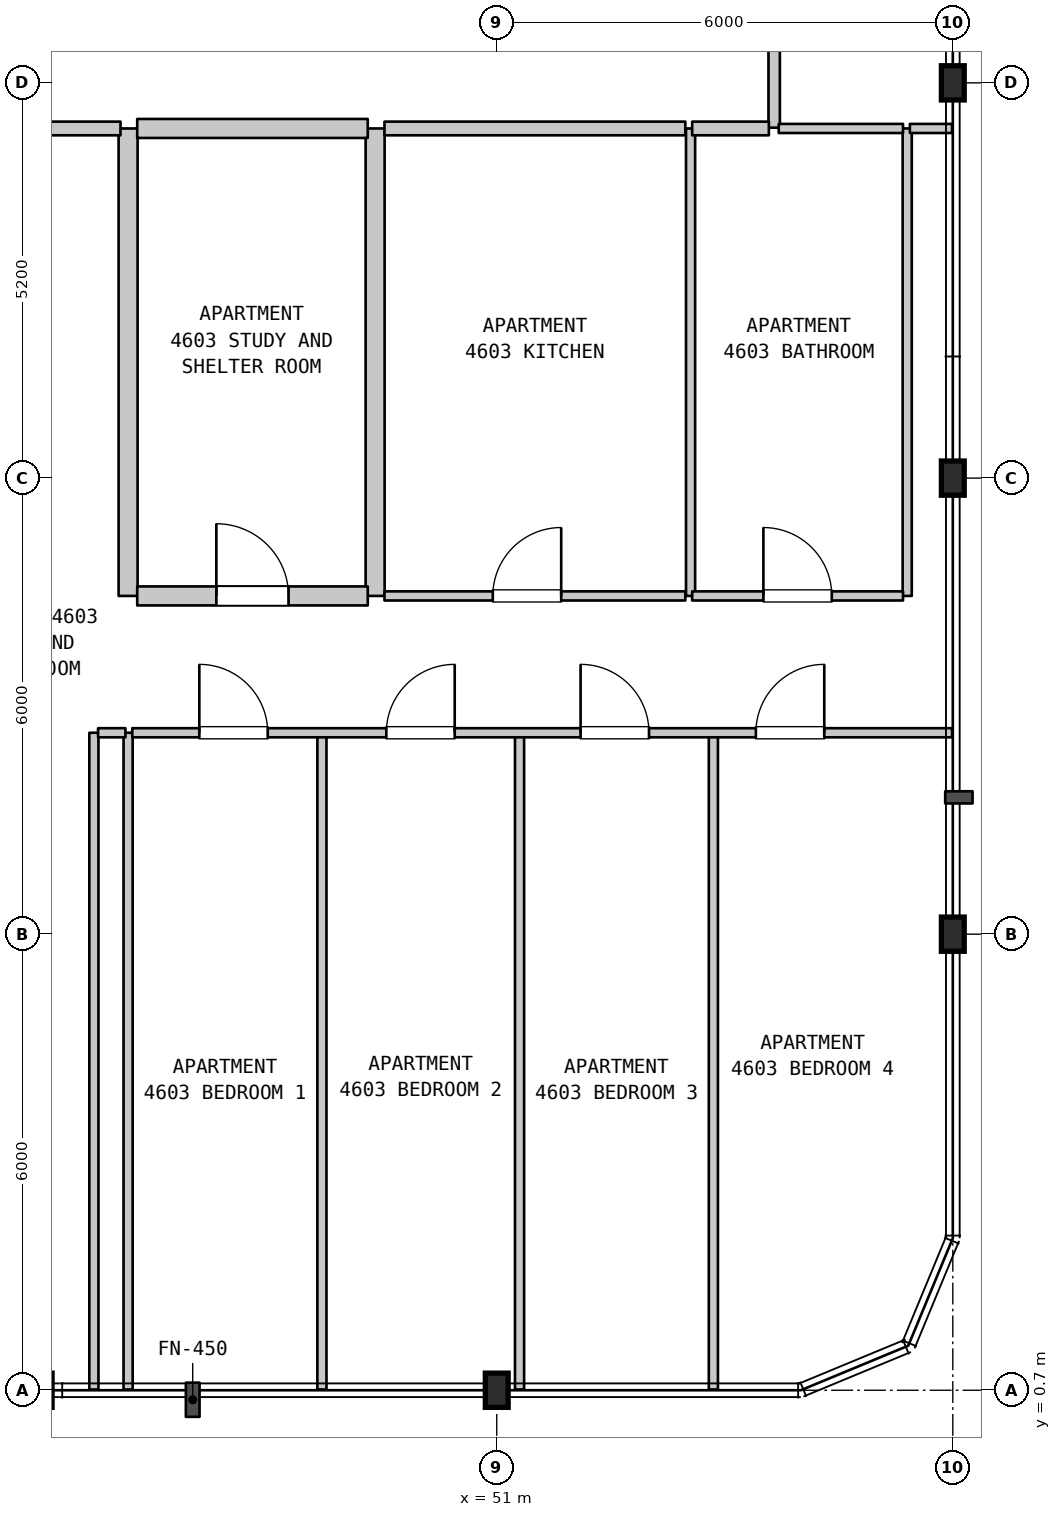
"""IFC4 building model, lengths in metres.
Left out: names, types, materials, properties, quantities, classifications, styles, units other than length and angle.
Written with IfcOpenShell. Run it as: python <this file> out.ifc"""

import sys

from ifc_helpers import new_model, si_unit, direction, frame, frame_2d, origin, origin_2d, place, context, subcontext, project, spatial, rectangle, i_section, extrude, element, fill, save


model = new_model("IFC4")
c1 = context("Model", 3, precision=1e-05, world=origin(), true_north=direction((0.0, 1.0)))
c2 = subcontext(c1, "Body", "Model", "MODEL_VIEW")
j1 = project(units=[si_unit("LENGTHUNIT", "METRE"), si_unit("PLANEANGLEUNIT", "RADIAN")], contexts=[c1])
p1 = place(None, origin())
s1 = spatial("IfcSite", under=j1, at=p1, CompositionType="ELEMENT")
p2 = place(p1, origin())
s2 = spatial("IfcBuilding", under=s1, at=p2, CompositionType="ELEMENT")
p3 = place(p2, frame((0.0, 0.0, 188.4)))
s3 = spatial("IfcBuildingStorey", under=s2, at=p3, CompositionType="ELEMENT", Elevation=188.4)
for number, where, z_axis, x_axis in (
    (1, (51.0, 0.7, 0.0), (0.0, 0.0, 1.0), (1.0, 0.0, 0.0)),
    (2, (57.0, 6.7, 0.0), (0.0, 0.0, 1.0), (1.0, 0.0, 0.0)),
    (3, (57.0, 12.7, 0.0), (0.0, 0.0, 1.0), (1.0, 0.0, 0.0)),
    (4, (57.0, 17.9, 0.0), (0.0, 0.0, 1.0), (1.0, 0.0, 0.0)),
):
    element("IfcColumn", number, at=place(p3, frame(where, z_axis=z_axis, x_axis=x_axis)), inside=s3, PredefinedType="COLUMN", context=c2, shape_type="SweptSolid", body=[
        extrude(i_section(OverallWidth=0.3, OverallDepth=0.45, WebThickness=0.014, FlangeThickness=0.026, FilletRadius=0.027, at=origin_2d()), origin(), (0.0, 0.0, 1.0), 3.7),
    ])
for number, where, z_axis, x_axis in (
    (5, (45.7, 0.71, 0.0), (0.0, 0.0, 1.0), (0.0, 1.0, 0.0)),
    (6, (46.15, 0.71, 0.0), (0.0, 0.0, 1.0), (0.0, 1.0, 0.0)),
):
    element("IfcWall", number, at=place(p3, frame(where, z_axis=z_axis, x_axis=x_axis)), inside=s3, PredefinedType="PARTITIONING", context=c2, shape_type="SweptSolid", body=[
        extrude(rectangle(XDim=8.64, YDim=0.12, at=frame_2d((4.32, 0.0))), origin(), (0.0, 0.0, 1.0), 3.39),
    ])
p4 = place(p3, frame((46.15, 11.15, 0.0), z_axis=(0.0, 0.0, 1.0), x_axis=(0.0, 1.0, 0.0)))
e7 = element("IfcWall", 7, at=p4, inside=s3, PredefinedType="STANDARD", context=c2, shape_type="SweptSolid", body=[
    extrude(rectangle(XDim=6.15, YDim=0.25, at=frame_2d((3.075, 0.0))), origin(), (0.0, 0.0, 1.0), 3.39),
])
p5 = place(p3, frame((48.7, 0.71, 0.0), z_axis=(0.0, 0.0, 1.0), x_axis=(0.0, 1.0, 0.0)))
e8 = element("IfcWall", 8, at=p5, inside=s3, PredefinedType="PARTITIONING", context=c2, shape_type="SweptSolid", body=[
    extrude(rectangle(XDim=8.64, YDim=0.12, at=frame_2d((4.32, 0.0))), origin(), (0.0, 0.0, 1.0), 3.39),
])
p6 = place(p3, frame((49.4, 11.15, 0.0), z_axis=(0.0, 0.0, 1.0), x_axis=(0.0, 1.0, 0.0)))
e9 = element("IfcWall", 9, at=p6, inside=s3, PredefinedType="STANDARD", context=c2, shape_type="SweptSolid", body=[
    extrude(rectangle(XDim=6.15, YDim=0.25, at=frame_2d((3.075, 0.0))), origin(), (0.0, 0.0, 1.0), 3.39),
])
p7 = place(p3, frame((51.3, 0.71, 0.0), z_axis=(0.0, 0.0, 1.0), x_axis=(0.0, 1.0, 0.0)))
e10 = element("IfcWall", 10, at=p7, inside=s3, PredefinedType="PARTITIONING", context=c2, shape_type="SweptSolid", body=[
    extrude(rectangle(XDim=8.64, YDim=0.12, at=frame_2d((4.32, 0.0))), origin(), (0.0, 0.0, 1.0), 3.39),
])
p8 = place(p3, frame((53.55, 11.15, 0.0), z_axis=(0.0, 0.0, 1.0), x_axis=(0.0, 1.0, 0.0)))
e11 = element("IfcWall", 11, at=p8, inside=s3, PredefinedType="PARTITIONING", context=c2, shape_type="SweptSolid", body=[
    extrude(rectangle(XDim=6.15, YDim=0.12, at=frame_2d((3.075, 0.0))), origin(), (0.0, 0.0, 1.0), 3.39),
])
p9 = place(p3, frame((53.85, 0.71, 0.0), z_axis=(0.0, 0.0, 1.0), x_axis=(0.0, 1.0, 0.0)))
e12 = element("IfcWall", 12, at=p9, inside=s3, PredefinedType="PARTITIONING", context=c2, shape_type="SweptSolid", body=[
    extrude(rectangle(XDim=8.64, YDim=0.12, at=frame_2d((4.32, 0.0))), origin(), (0.0, 0.0, 1.0), 3.39),
])
p10 = place(p3, frame((54.65, 17.31, 0.0), z_axis=(0.0, 0.0, 1.0), x_axis=(0.0, 1.0, 0.0)))
e13 = element("IfcWall", 13, at=p10, inside=s3, PredefinedType="STANDARD", context=c2, shape_type="SweptSolid", body=[
    extrude(rectangle(XDim=2.19, YDim=0.15, at=frame_2d((1.095, 0.0))), origin(), (0.0, 0.0, 1.0), 3.39),
])
p11 = place(p3, frame((56.4, 11.15, 0.0), z_axis=(0.0, 0.0, 1.0), x_axis=(0.0, 1.0, 0.0)))
e14 = element("IfcWall", 14, at=p11, inside=s3, PredefinedType="PARTITIONING", context=c2, shape_type="SweptSolid", body=[
    extrude(rectangle(XDim=6.15, YDim=0.12, at=frame_2d((3.075, 0.0))), origin(), (0.0, 0.0, 1.0), 3.39),
])
p12 = place(p3, frame((45.755, 9.35, 0.0), z_axis=(0.0, 0.0, 1.0), x_axis=(1.0, 0.0, 0.0)))
e15 = element("IfcWall", 15, at=p12, inside=s3, PredefinedType="PARTITIONING", context=c2, shape_type="SweptSolid", body=[
    extrude(rectangle(XDim=0.36, YDim=0.12, at=frame_2d((0.18, 0.0))), origin(), (0.0, 0.0, 1.0), 3.39),
])
p13 = place(p3, frame((46.205, 9.35, 0.0), z_axis=(0.0, 0.0, 1.0), x_axis=(1.0, 0.0, 0.0)))
e16 = element("IfcWall", 16, at=p13, inside=s3, PredefinedType="PARTITIONING", context=c2, shape_type="SweptSolid", body=[
    extrude(rectangle(XDim=10.785, YDim=0.12, at=frame_2d((5.393, 0.0))), origin(), (0.0, 0.0, 1.0), 3.39),
])
p14 = place(p13, frame((0.882, 0.0, 0.0)))
e17 = element("IfcOpeningElement", 17, at=p14, cuts=e16, PredefinedType="OPENING", context=c2, shape_type="SweptSolid", body=[
    extrude(rectangle(XDim=0.9, YDim=2.15, at=frame_2d((0.45, 1.075))), frame((0.0, 0.07, 0.0), z_axis=(0.0, -1.0, 0.0), x_axis=(1.0, 0.0, 0.0)), (0.0, 0.0, 1.0), 0.14),
])
p15 = place(p13, frame((3.342, 0.0, 0.0)))
e18 = element("IfcOpeningElement", 18, at=p15, cuts=e16, PredefinedType="OPENING", context=c2, shape_type="SweptSolid", body=[
    extrude(rectangle(XDim=0.9, YDim=2.15, at=frame_2d((0.45, 1.075))), frame((0.0, 0.07, 0.0), z_axis=(0.0, -1.0, 0.0), x_axis=(1.0, 0.0, 0.0)), (0.0, 0.0, 1.0), 0.14),
])
p16 = place(p13, frame((5.898, 0.0, 0.0)))
e19 = element("IfcOpeningElement", 19, at=p16, cuts=e16, PredefinedType="OPENING", context=c2, shape_type="SweptSolid", body=[
    extrude(rectangle(XDim=0.9, YDim=2.15, at=frame_2d((0.45, 1.075))), frame((0.0, 0.07, 0.0), z_axis=(0.0, -1.0, 0.0), x_axis=(1.0, 0.0, 0.0)), (0.0, 0.0, 1.0), 0.14),
])
p17 = place(p13, frame((8.204, 0.0, 0.0)))
e20 = element("IfcOpeningElement", 20, at=p17, cuts=e16, PredefinedType="OPENING", context=c2, shape_type="SweptSolid", body=[
    extrude(rectangle(XDim=0.9, YDim=2.15, at=frame_2d((0.45, 1.075))), frame((0.0, 0.07, 0.0), z_axis=(0.0, -1.0, 0.0), x_axis=(1.0, 0.0, 0.0)), (0.0, 0.0, 1.0), 0.14),
])
p18 = place(p3, frame((46.27, 11.15, 0.0), z_axis=(0.0, 0.0, 1.0), x_axis=(1.0, 0.0, 0.0)))
e21 = element("IfcWall", 21, at=p18, inside=s3, PredefinedType="STANDARD", context=c2, shape_type="SweptSolid", body=[
    extrude(rectangle(XDim=3.033, YDim=0.25, at=frame_2d((1.517, 0.0))), origin(), (0.0, 0.0, 1.0), 3.39),
])
p19 = place(p18, frame((1.041, 0.0, 0.0)))
e22 = element("IfcOpeningElement", 22, at=p19, cuts=e21, PredefinedType="OPENING", context=c2, shape_type="SweptSolid", body=[
    extrude(rectangle(XDim=0.95, YDim=2.15, at=frame_2d((0.475, 1.075))), frame((0.0, 0.135, 0.0), z_axis=(0.0, -1.0, 0.0), x_axis=(1.0, 0.0, 0.0)), (0.0, 0.0, 1.0), 0.27),
])
p20 = place(p3, frame((49.523, 11.15, 0.0), z_axis=(0.0, 0.0, 1.0), x_axis=(1.0, 0.0, 0.0)))
e23 = element("IfcWall", 23, at=p20, inside=s3, PredefinedType="PARTITIONING", context=c2, shape_type="SweptSolid", body=[
    extrude(rectangle(XDim=3.958, YDim=0.12, at=frame_2d((1.979, 0.0))), origin(), (0.0, 0.0, 1.0), 3.39),
])
p21 = place(p20, frame((1.425, 0.0, 0.0)))
e24 = element("IfcOpeningElement", 24, at=p21, cuts=e23, PredefinedType="OPENING", context=c2, shape_type="SweptSolid", body=[
    extrude(rectangle(XDim=0.9, YDim=2.15, at=frame_2d((0.45, 1.075))), frame((0.0, 0.07, 0.0), z_axis=(0.0, -1.0, 0.0), x_axis=(1.0, 0.0, 0.0)), (0.0, 0.0, 1.0), 0.14),
])
p22 = place(p3, frame((53.571, 11.15, 0.0), z_axis=(0.0, 0.0, 1.0), x_axis=(1.0, 0.0, 0.0)))
e25 = element("IfcWall", 25, at=p22, inside=s3, PredefinedType="PARTITIONING", context=c2, shape_type="SweptSolid", body=[
    extrude(rectangle(XDim=2.774, YDim=0.12, at=frame_2d((1.387, 0.0))), origin(), (0.0, 0.0, 1.0), 3.39),
])
p23 = place(p22, frame((0.937, 0.0, 0.0)))
e26 = element("IfcOpeningElement", 26, at=p23, cuts=e25, PredefinedType="OPENING", context=c2, shape_type="SweptSolid", body=[
    extrude(rectangle(XDim=0.9, YDim=2.1, at=frame_2d((0.45, 1.05))), frame((0.0, 0.07, 0.0), z_axis=(0.0, -1.0, 0.0), x_axis=(1.0, 0.0, 0.0)), (0.0, 0.0, 1.0), 0.14),
])
p24 = place(p3, frame((40.505, 17.3, 0.0), z_axis=(0.0, 0.0, 1.0), x_axis=(1.0, 0.0, 0.0)))
e27 = element("IfcWall", 27, at=p24, inside=s3, PredefinedType="STANDARD", context=c2, shape_type="SweptSolid", body=[
    extrude(rectangle(XDim=5.545, YDim=0.18, at=frame_2d((2.772, 0.0))), origin(), (0.0, 0.0, 1.0), 3.39),
])
p25 = place(p24, frame((2.305, 0.0, 0.0)))
e28 = element("IfcOpeningElement", 28, at=p25, cuts=e27, PredefinedType="OPENING", context=c2, shape_type="SweptSolid", body=[
    extrude(rectangle(XDim=1.0, YDim=2.15, at=frame_2d((0.5, 1.075))), frame((0.0, 0.1, 0.0), z_axis=(0.0, -1.0, 0.0), x_axis=(1.0, 0.0, 0.0)), (0.0, 0.0, 1.0), 0.2),
])
p26 = place(p3, frame((46.27, 17.3, 0.0), z_axis=(0.0, 0.0, 1.0), x_axis=(1.0, 0.0, 0.0)))
e29 = element("IfcWall", 29, at=p26, inside=s3, PredefinedType="STANDARD", context=c2, shape_type="SweptSolid", body=[
    extrude(rectangle(XDim=3.033, YDim=0.25, at=frame_2d((1.517, 0.0))), origin(), (0.0, 0.0, 1.0), 3.39),
])
p27 = place(p3, frame((49.523, 17.3, 0.0), z_axis=(0.0, 0.0, 1.0), x_axis=(1.0, 0.0, 0.0)))
e30 = element("IfcWall", 30, at=p27, inside=s3, PredefinedType="STANDARD", context=c2, shape_type="SweptSolid", body=[
    extrude(rectangle(XDim=3.958, YDim=0.18, at=frame_2d((1.979, 0.0))), origin(), (0.0, 0.0, 1.0), 3.39),
])
p28 = place(p3, frame((53.571, 17.3, 0.0), z_axis=(0.0, 0.0, 1.0), x_axis=(1.0, 0.0, 0.0)))
e31 = element("IfcWall", 31, at=p28, inside=s3, PredefinedType="STANDARD", context=c2, shape_type="SweptSolid", body=[
    extrude(rectangle(XDim=1.009, YDim=0.18, at=frame_2d((0.504, 0.0))), origin(), (0.0, 0.0, 1.0), 3.39),
])
p29 = place(p3, frame((54.71, 17.3, 0.0), z_axis=(0.0, 0.0, 1.0), x_axis=(1.0, 0.0, 0.0)))
e32 = element("IfcWall", 32, at=p29, inside=s3, PredefinedType="PARTITIONING", context=c2, shape_type="SweptSolid", body=[
    extrude(rectangle(XDim=1.635, YDim=0.12, at=frame_2d((0.817, 0.0))), origin(), (0.0, 0.0, 1.0), 3.39),
])
p30 = place(p3, frame((56.435, 17.3, 0.0), z_axis=(0.0, 0.0, 1.0), x_axis=(1.0, 0.0, 0.0)))
e33 = element("IfcWall", 33, at=p30, inside=s3, PredefinedType="PARTITIONING", context=c2, shape_type="SweptSolid", body=[
    extrude(rectangle(XDim=0.555, YDim=0.12, at=frame_2d((0.277, 0.0))), origin(), (0.0, 0.0, 1.0), 3.39),
])
p31 = place(p14, origin())
e34 = element("IfcDoor", 34, at=p31, inside=s3, OperationType="SINGLE_SWING_LEFT", PredefinedType="DOOR", context=c2, shape_type="SweptSolid", body=[
    extrude(rectangle(XDim=0.9, YDim=2.15, at=frame_2d((0.45, 1.075))), frame((0.0, 0.025, 0.0), z_axis=(0.0, -1.0, 0.0), x_axis=(1.0, 0.0, 0.0)), (0.0, 0.0, 1.0), 0.05),
])
fill(e17, e34)
p32 = place(p15, origin())
e35 = element("IfcDoor", 35, at=p32, inside=s3, OperationType="SINGLE_SWING_RIGHT", PredefinedType="DOOR", context=c2, shape_type="SweptSolid", body=[
    extrude(rectangle(XDim=0.9, YDim=2.15, at=frame_2d((0.45, 1.075))), frame((0.0, 0.025, 0.0), z_axis=(0.0, -1.0, 0.0), x_axis=(1.0, 0.0, 0.0)), (0.0, 0.0, 1.0), 0.05),
])
fill(e18, e35)
p33 = place(p16, origin())
e36 = element("IfcDoor", 36, at=p33, inside=s3, OperationType="SINGLE_SWING_LEFT", PredefinedType="DOOR", context=c2, shape_type="SweptSolid", body=[
    extrude(rectangle(XDim=0.9, YDim=2.15, at=frame_2d((0.45, 1.075))), frame((0.0, 0.025, 0.0), z_axis=(0.0, -1.0, 0.0), x_axis=(1.0, 0.0, 0.0)), (0.0, 0.0, 1.0), 0.05),
])
fill(e19, e36)
p34 = place(p17, origin())
e37 = element("IfcDoor", 37, at=p34, inside=s3, OperationType="SINGLE_SWING_RIGHT", PredefinedType="DOOR", context=c2, shape_type="SweptSolid", body=[
    extrude(rectangle(XDim=0.9, YDim=2.15, at=frame_2d((0.45, 1.075))), frame((0.0, 0.025, 0.0), z_axis=(0.0, -1.0, 0.0), x_axis=(1.0, 0.0, 0.0)), (0.0, 0.0, 1.0), 0.05),
])
fill(e20, e37)
p35 = place(p19, origin())
e38 = element("IfcDoor", 38, at=p35, inside=s3, OperationType="SINGLE_SWING_LEFT", PredefinedType="DOOR", context=c2, shape_type="SweptSolid", body=[
    extrude(rectangle(XDim=0.95, YDim=2.15, at=frame_2d((0.475, 1.075))), frame((0.0, 0.025, 0.0), z_axis=(0.0, -1.0, 0.0), x_axis=(1.0, 0.0, 0.0)), (0.0, 0.0, 1.0), 0.05),
])
fill(e22, e38)
p36 = place(p21, origin())
e39 = element("IfcDoor", 39, at=p36, inside=s3, OperationType="SINGLE_SWING_RIGHT", PredefinedType="DOOR", context=c2, shape_type="SweptSolid", body=[
    extrude(rectangle(XDim=0.9, YDim=2.15, at=frame_2d((0.45, 1.075))), frame((0.0, 0.025, 0.0), z_axis=(0.0, -1.0, 0.0), x_axis=(1.0, 0.0, 0.0)), (0.0, 0.0, 1.0), 0.05),
])
fill(e24, e39)
p37 = place(p23, origin())
e40 = element("IfcDoor", 40, at=p37, inside=s3, OperationType="SINGLE_SWING_LEFT", PredefinedType="DOOR", context=c2, shape_type="SweptSolid", body=[
    extrude(rectangle(XDim=0.9, YDim=2.1, at=frame_2d((0.45, 1.05))), frame((0.0, 0.025, 0.0), z_axis=(0.0, -1.0, 0.0), x_axis=(1.0, 0.0, 0.0)), (0.0, 0.0, 1.0), 0.05),
])
fill(e26, e40)
save(model, sys.argv[1])
